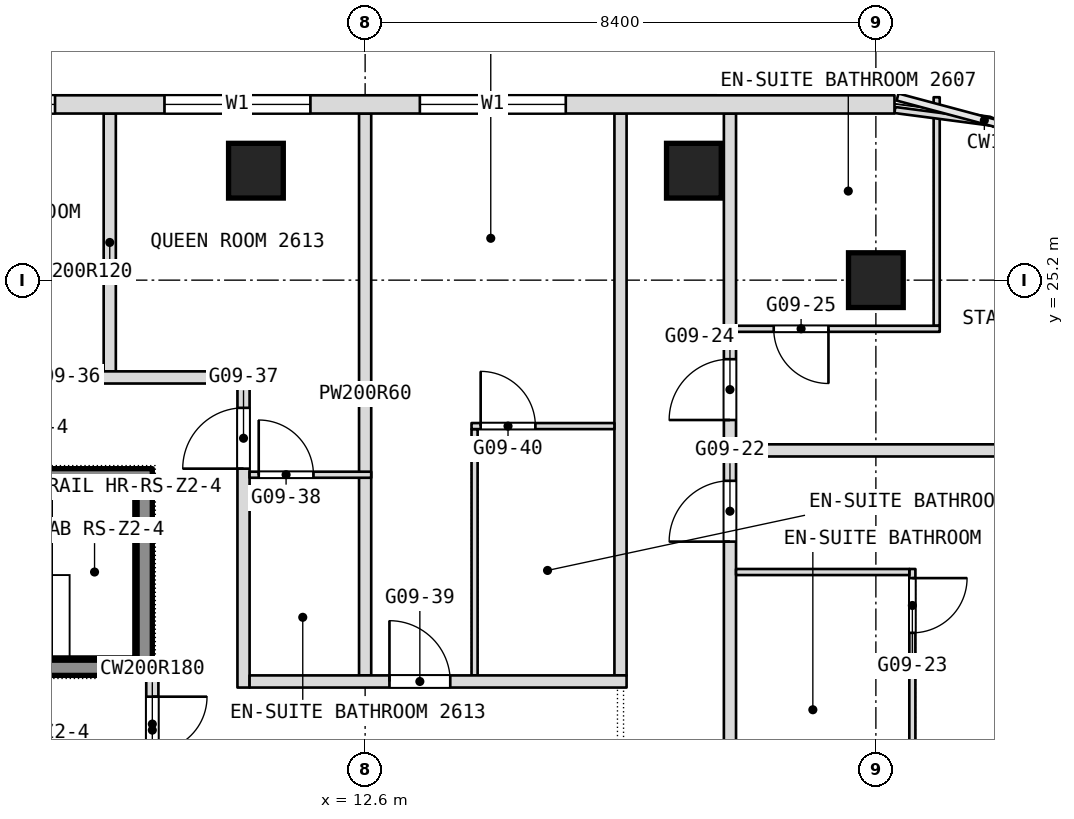
"""IFC4 building model, lengths in metres.
Left out: names, types, materials, properties, quantities, classifications, styles, units other than length and angle.
Written with IfcOpenShell. Run it as: python <this file> out.ifc"""

import sys

from ifc_helpers import new_model, si_unit, direction, frame, frame_2d, origin, origin_2d, place, context, subcontext, project, spatial, rectangle, extrude, element, fill, save


model = new_model("IFC4")
c1 = context("Model", 3, precision=1e-05, world=origin(), true_north=direction((0.0, 1.0)))
c2 = subcontext(c1, "Body", "Model", "MODEL_VIEW")
j1 = project(units=[si_unit("LENGTHUNIT", "METRE"), si_unit("PLANEANGLEUNIT", "RADIAN")], contexts=[c1])
p1 = place(None, origin())
s1 = spatial("IfcSite", under=j1, at=p1, CompositionType="ELEMENT")
p2 = place(p1, origin())
s2 = spatial("IfcBuilding", under=s1, at=p2, CompositionType="ELEMENT")
p3 = place(p2, frame((0.0, 0.0, 119.3)))
s3 = spatial("IfcBuildingStorey", under=s2, at=p3, CompositionType="ELEMENT", Elevation=119.3)
for number, where, z_axis, x_axis in (
    (1, (21.0, 25.2, 0.0), (0.0, 0.0, 1.0), (1.0, 0.0, 0.0)),
    (2, (10.804, 27.0, 0.0), (0.0, 0.0, 1.0), (1.0, 0.0, 0.0)),
    (3, (18.007, 27.0, 0.0), (0.0, 0.0, 1.0), (1.0, 0.0, 0.0)),
):
    element("IfcColumn", number, at=place(p3, frame(where, z_axis=z_axis, x_axis=x_axis)), inside=s3, PredefinedType="COLUMN", context=c2, shape_type="SweptSolid", body=[
        extrude(rectangle(XDim=0.9, YDim=0.9, at=origin_2d()), origin(), (0.0, 0.0, 1.0), 3.6),
    ])
p4 = place(p3, frame((22.0, 24.45, 0.0), z_axis=(0.0, 0.0, 1.0), x_axis=(0.0, 1.0, 0.0)))
e4 = element("IfcWall", 4, at=p4, inside=s3, PredefinedType="PARTITIONING", context=c2, shape_type="SweptSolid", body=[
    extrude(rectangle(XDim=3.758, YDim=0.1, at=frame_2d((1.879, 0.0))), origin(), (0.0, 0.0, 1.0), 3.34),
])
p5 = place(p3, frame((21.6, 16.9, 0.0), z_axis=(0.0, 0.0, 1.0), x_axis=(0.0, 1.0, 0.0)))
e5 = element("IfcWall", 5, at=p5, inside=s3, PredefinedType="PARTITIONING", context=c2, shape_type="SweptSolid", body=[
    extrude(rectangle(XDim=3.55, YDim=0.1, at=frame_2d((1.775, 0.0))), origin(), (0.0, 0.0, 1.0), 3.34),
])
p6 = place(p5, frame((2.5, 0.0, 0.0)))
e6 = element("IfcOpeningElement", 6, at=p6, cuts=e5, PredefinedType="OPENING", context=c2, shape_type="SweptSolid", body=[
    extrude(rectangle(XDim=0.9, YDim=2.1, at=frame_2d((0.45, 1.05))), frame((0.0, 0.05, 0.0), z_axis=(0.0, -1.0, 0.0), x_axis=(1.0, 0.0, 0.0)), (0.0, 0.0, 1.0), 0.1),
])
p7 = place(p3, frame((18.6, -21.708, 0.0), z_axis=(0.0, 0.0, 1.0), x_axis=(0.0, 1.0, 0.0)))
e7 = element("IfcWall", 7, at=p7, inside=s3, PredefinedType="PARTITIONING", context=c2, shape_type="SweptSolid", body=[
    extrude(rectangle(XDim=49.648, YDim=0.2, at=frame_2d((24.824, 0.0))), origin(), (0.0, 0.0, 1.0), 3.34),
])
p8 = place(p7, frame((2.8, 0.0, 0.0)))
e8 = element("IfcOpeningElement", 8, at=p8, cuts=e7, PredefinedType="OPENING", context=c2, shape_type="SweptSolid", body=[
    extrude(rectangle(XDim=1.0, YDim=2.1, at=frame_2d((0.5, 1.05))), frame((0.0, 0.1, 0.0), z_axis=(0.0, -1.0, 0.0), x_axis=(1.0, 0.0, 0.0)), (0.0, 0.0, 1.0), 0.2),
])
p9 = place(p7, frame((10.658, 0.0, 0.0)))
e9 = element("IfcOpeningElement", 9, at=p9, cuts=e7, PredefinedType="OPENING", context=c2, shape_type="SweptSolid", body=[
    extrude(rectangle(XDim=1.1, YDim=2.1, at=frame_2d((0.55, 1.05))), frame((0.0, 0.1, 0.0), z_axis=(0.0, -1.0, 0.0), x_axis=(1.0, 0.0, 0.0)), (0.0, 0.0, 1.0), 0.2),
])
p10 = place(p7, frame((16.608, 0.0, 0.0)))
e10 = element("IfcOpeningElement", 10, at=p10, cuts=e7, PredefinedType="OPENING", context=c2, shape_type="SweptSolid", body=[
    extrude(rectangle(XDim=1.8, YDim=2.1, at=frame_2d((0.9, 1.05))), frame((0.0, 0.1, 0.0), z_axis=(0.0, -1.0, 0.0), x_axis=(1.0, 0.0, 0.0)), (0.0, 0.0, 1.0), 0.2),
])
p11 = place(p7, frame((24.508, 0.0, 0.0)))
e11 = element("IfcOpeningElement", 11, at=p11, cuts=e7, PredefinedType="OPENING", context=c2, shape_type="SweptSolid", body=[
    extrude(rectangle(XDim=1.0, YDim=2.1, at=frame_2d((0.5, 1.05))), frame((0.0, 0.1, 0.0), z_axis=(0.0, -1.0, 0.0), x_axis=(1.0, 0.0, 0.0)), (0.0, 0.0, 1.0), 0.2),
])
p12 = place(p7, frame((26.308, 0.0, 0.0)))
e12 = element("IfcOpeningElement", 12, at=p12, cuts=e7, PredefinedType="OPENING", context=c2, shape_type="SweptSolid", body=[
    extrude(rectangle(XDim=1.0, YDim=2.1, at=frame_2d((0.5, 1.05))), frame((0.0, 0.1, 0.0), z_axis=(0.0, -1.0, 0.0), x_axis=(1.0, 0.0, 0.0)), (0.0, 0.0, 1.0), 0.2),
])
p13 = place(p7, frame((33.708, 0.0, 0.0)))
e13 = element("IfcOpeningElement", 13, at=p13, cuts=e7, PredefinedType="OPENING", context=c2, shape_type="SweptSolid", body=[
    extrude(rectangle(XDim=1.1, YDim=2.1, at=frame_2d((0.55, 1.05))), frame((0.0, 0.1, 0.0), z_axis=(0.0, -1.0, 0.0), x_axis=(1.0, 0.0, 0.0)), (0.0, 0.0, 1.0), 0.2),
])
p14 = place(p7, frame((42.608, 0.0, 0.0)))
e14 = element("IfcOpeningElement", 14, at=p14, cuts=e7, PredefinedType="OPENING", context=c2, shape_type="SweptSolid", body=[
    extrude(rectangle(XDim=1.0, YDim=2.1, at=frame_2d((0.5, 1.05))), frame((0.0, 0.1, 0.0), z_axis=(0.0, -1.0, 0.0), x_axis=(1.0, 0.0, 0.0)), (0.0, 0.0, 1.0), 0.2),
])
p15 = place(p7, frame((44.608, 0.0, 0.0)))
e15 = element("IfcOpeningElement", 15, at=p15, cuts=e7, PredefinedType="OPENING", context=c2, shape_type="SweptSolid", body=[
    extrude(rectangle(XDim=1.0, YDim=2.1, at=frame_2d((0.5, 1.05))), frame((0.0, 0.1, 0.0), z_axis=(0.0, -1.0, 0.0), x_axis=(1.0, 0.0, 0.0)), (0.0, 0.0, 1.0), 0.2),
])
p16 = place(p3, frame((16.8, 18.7, 0.0), z_axis=(0.0, 0.0, 1.0), x_axis=(0.0, 1.0, 0.0)))
e16 = element("IfcWall", 16, at=p16, inside=s3, PredefinedType="PARTITIONING", context=c2, shape_type="SweptSolid", body=[
    extrude(rectangle(XDim=9.24, YDim=0.2, at=frame_2d((4.62, 0.0))), origin(), (0.0, 0.0, 1.0), 3.34),
])
p17 = place(p3, frame((14.4, 18.7, 0.0), z_axis=(0.0, 0.0, 1.0), x_axis=(0.0, 1.0, 0.0)))
e17 = element("IfcWall", 17, at=p17, inside=s3, PredefinedType="PARTITIONING", context=c2, shape_type="SweptSolid", body=[
    extrude(rectangle(XDim=4.05, YDim=0.1, at=frame_2d((2.025, 0.0))), origin(), (0.0, 0.0, 1.0), 3.34),
])
p18 = place(p3, frame((12.6, 18.7, 0.0), z_axis=(0.0, 0.0, 1.0), x_axis=(0.0, 1.0, 0.0)))
e18 = element("IfcWall", 18, at=p18, inside=s3, PredefinedType="PARTITIONING", context=c2, shape_type="SweptSolid", body=[
    extrude(rectangle(XDim=9.24, YDim=0.2, at=frame_2d((4.62, 0.0))), origin(), (0.0, 0.0, 1.0), 3.34),
])
p19 = place(p3, frame((10.6, 18.5, 0.0), z_axis=(0.0, 0.0, 1.0), x_axis=(0.0, 1.0, 0.0)))
e19 = element("IfcWall", 19, at=p19, inside=s3, PredefinedType="PARTITIONING", context=c2, shape_type="SweptSolid", body=[
    extrude(rectangle(XDim=5.0, YDim=0.2, at=frame_2d((2.5, 0.0))), origin(), (0.0, 0.0, 1.0), 3.34),
])
p20 = place(p19, frame((3.6, 0.0, 0.0)))
e20 = element("IfcOpeningElement", 20, at=p20, cuts=e19, PredefinedType="OPENING", context=c2, shape_type="SweptSolid", body=[
    extrude(rectangle(XDim=1.0, YDim=2.1, at=frame_2d((0.5, 1.05))), frame((0.0, 0.1, 0.0), z_axis=(0.0, -1.0, 0.0), x_axis=(1.0, 0.0, 0.0)), (0.0, 0.0, 1.0), 0.2),
])
p21 = place(p3, frame((9.1, 16.9, 0.0), z_axis=(0.0, 0.0, 1.0), x_axis=(0.0, 1.0, 0.0)))
e21 = element("IfcWall", 21, at=p21, inside=s3, PredefinedType="PARTITIONING", context=c2, shape_type="SweptSolid", body=[
    extrude(rectangle(XDim=1.8, YDim=0.2, at=frame_2d((0.9, 0.0))), origin(), (0.0, 0.0, 1.0), 3.34),
])
p22 = place(p21, frame((0.55, 0.0, 0.0)))
e22 = element("IfcOpeningElement", 22, at=p22, cuts=e21, PredefinedType="OPENING", context=c2, shape_type="SweptSolid", body=[
    extrude(rectangle(XDim=0.9, YDim=2.1, at=frame_2d((0.45, 1.05))), frame((0.0, 0.1, 0.0), z_axis=(0.0, -1.0, 0.0), x_axis=(1.0, 0.0, 0.0)), (0.0, 0.0, 1.0), 0.2),
])
p23 = place(p3, frame((8.4, 23.7, 0.0), z_axis=(0.0, 0.0, 1.0), x_axis=(0.0, 1.0, 0.0)))
e23 = element("IfcWall", 23, at=p23, inside=s3, PredefinedType="PARTITIONING", context=c2, shape_type="SweptSolid", body=[
    extrude(rectangle(XDim=4.24, YDim=0.2, at=frame_2d((2.12, 0.0))), origin(), (0.0, 0.0, 1.0), 3.34),
])
p24 = place(p3, frame((10.7, 18.6, 0.0), z_axis=(0.0, 0.0, 1.0), x_axis=(1.0, 0.0, 0.0)))
e24 = element("IfcWall", 24, at=p24, inside=s3, PredefinedType="PARTITIONING", context=c2, shape_type="SweptSolid", body=[
    extrude(rectangle(XDim=6.2, YDim=0.2, at=frame_2d((3.1, 0.0))), origin(), (0.0, 0.0, 1.0), 3.34),
])
p25 = place(p24, frame((2.3, 0.0, 0.0)))
e25 = element("IfcOpeningElement", 25, at=p25, cuts=e24, PredefinedType="OPENING", context=c2, shape_type="SweptSolid", body=[
    extrude(rectangle(XDim=1.0, YDim=2.1, at=frame_2d((0.5, 1.05))), frame((0.0, 0.1, 0.0), z_axis=(0.0, -1.0, 0.0), x_axis=(1.0, 0.0, 0.0)), (0.0, 0.0, 1.0), 0.2),
])
p26 = place(p3, frame((18.7, 20.4, 0.0), z_axis=(0.0, 0.0, 1.0), x_axis=(1.0, 0.0, 0.0)))
e26 = element("IfcWall", 26, at=p26, inside=s3, PredefinedType="PARTITIONING", context=c2, shape_type="SweptSolid", body=[
    extrude(rectangle(XDim=2.85, YDim=0.1, at=frame_2d((1.425, 0.0))), origin(), (0.0, 0.0, 1.0), 3.34),
])
p27 = place(p3, frame((10.7, 22.0, 0.0), z_axis=(0.0, 0.0, 1.0), x_axis=(1.0, 0.0, 0.0)))
e27 = element("IfcWall", 27, at=p27, inside=s3, PredefinedType="PARTITIONING", context=c2, shape_type="SweptSolid", body=[
    extrude(rectangle(XDim=2.0, YDim=0.1, at=frame_2d((1.0, 0.0))), origin(), (0.0, 0.0, 1.0), 3.34),
])
p28 = place(p27, frame((0.15, 0.0, 0.0)))
e28 = element("IfcOpeningElement", 28, at=p28, cuts=e27, PredefinedType="OPENING", context=c2, shape_type="SweptSolid", body=[
    extrude(rectangle(XDim=0.9, YDim=2.1, at=frame_2d((0.45, 1.05))), frame((0.0, 0.05, 0.0), z_axis=(0.0, -1.0, 0.0), x_axis=(1.0, 0.0, 0.0)), (0.0, 0.0, 1.0), 0.1),
])
p29 = place(p3, frame((18.7, 22.4, 0.0), z_axis=(0.0, 0.0, 1.0), x_axis=(1.0, 0.0, 0.0)))
e29 = element("IfcWall", 29, at=p29, inside=s3, PredefinedType="PARTITIONING", context=c2, shape_type="SweptSolid", body=[
    extrude(rectangle(XDim=8.847, YDim=0.2, at=frame_2d((4.424, 0.0))), origin(), (0.0, 0.0, 1.0), 3.34),
])
p30 = place(p3, frame((14.35, 22.8, 0.0), z_axis=(0.0, 0.0, 1.0), x_axis=(1.0, 0.0, 0.0)))
e30 = element("IfcWall", 30, at=p30, inside=s3, PredefinedType="PARTITIONING", context=c2, shape_type="SweptSolid", body=[
    extrude(rectangle(XDim=2.35, YDim=0.1, at=frame_2d((1.175, 0.0))), origin(), (0.0, 0.0, 1.0), 3.34),
])
p31 = place(p30, frame((0.15, 0.0, 0.0)))
e31 = element("IfcOpeningElement", 31, at=p31, cuts=e30, PredefinedType="OPENING", context=c2, shape_type="SweptSolid", body=[
    extrude(rectangle(XDim=0.9, YDim=2.1, at=frame_2d((0.45, 1.05))), frame((0.0, 0.05, 0.0), z_axis=(0.0, -1.0, 0.0), x_axis=(1.0, 0.0, 0.0)), (0.0, 0.0, 1.0), 0.1),
])
p32 = place(p3, frame((1.5, 23.6, 0.0), z_axis=(0.0, 0.0, 1.0), x_axis=(1.0, 0.0, 0.0)))
e32 = element("IfcWall", 32, at=p32, inside=s3, PredefinedType="PARTITIONING", context=c2, shape_type="SweptSolid", body=[
    extrude(rectangle(XDim=9.2, YDim=0.2, at=frame_2d((4.6, 0.0))), origin(), (0.0, 0.0, 1.0), 3.34),
])
p33 = place(p32, frame((4.3, 0.0, 0.0)))
e33 = element("IfcOpeningElement", 33, at=p33, cuts=e32, PredefinedType="OPENING", context=c2, shape_type="SweptSolid", body=[
    extrude(rectangle(XDim=1.0, YDim=2.1, at=frame_2d((0.5, 1.05))), frame((0.0, 0.1, 0.0), z_axis=(0.0, -1.0, 0.0), x_axis=(1.0, 0.0, 0.0)), (0.0, 0.0, 1.0), 0.2),
])
p34 = place(p3, frame((18.7, 24.4, 0.0), z_axis=(0.0, 0.0, 1.0), x_axis=(1.0, 0.0, 0.0)))
e34 = element("IfcWall", 34, at=p34, inside=s3, PredefinedType="PARTITIONING", context=c2, shape_type="SweptSolid", body=[
    extrude(rectangle(XDim=3.35, YDim=0.1, at=frame_2d((1.675, 0.0))), origin(), (0.0, 0.0, 1.0), 3.34),
])
p35 = place(p34, frame((0.62, 0.0, 0.0)))
e35 = element("IfcOpeningElement", 35, at=p35, cuts=e34, PredefinedType="OPENING", context=c2, shape_type="SweptSolid", body=[
    extrude(rectangle(XDim=0.9, YDim=2.1, at=frame_2d((0.45, 1.05))), frame((0.0, 0.05, 0.0), z_axis=(0.0, -1.0, 0.0), x_axis=(1.0, 0.0, 0.0)), (0.0, 0.0, 1.0), 0.1),
])
p36 = place(p3, frame((21.312, 27.998, 0.0), z_axis=(0.0, 0.0, 1.0), x_axis=(0.991547575144, -0.129743617284, 0.0)))
e36 = element("IfcWall", 36, at=p36, inside=s3, PredefinedType="PARTITIONING", context=c2, shape_type="SweptSolid", body=[
    extrude(rectangle(XDim=1.626, YDim=0.1, at=frame_2d((0.813, 0.0))), origin(), (0.0, 0.0, 1.0), 3.34),
])
p37 = place(p3, frame((21.306, 28.09, 0.0), z_axis=(0.0, 0.0, 1.0), x_axis=(-1.0, 0.0, 0.0)))
e37 = element("IfcWall", 37, at=p37, inside=s3, PredefinedType="NOTDEFINED", context=c2, shape_type="SweptSolid", body=[
    extrude(rectangle(XDim=42.612, YDim=0.3, at=frame_2d((21.306, 0.0))), origin(), (0.0, 0.0, 1.0), 3.6),
])
p38 = place(p37, frame((5.406, 0.0, 0.9)))
e38 = element("IfcOpeningElement", 38, at=p38, cuts=e37, PredefinedType="OPENING", context=c2, shape_type="SweptSolid", body=[
    extrude(rectangle(XDim=2.4, YDim=2.1, at=frame_2d((1.2, 1.05))), frame((0.0, 0.15, 0.0), z_axis=(0.0, -1.0, 0.0), x_axis=(1.0, 0.0, 0.0)), (0.0, 0.0, 1.0), 0.3),
])
p39 = place(p37, frame((9.606, 0.0, 0.9)))
e39 = element("IfcOpeningElement", 39, at=p39, cuts=e37, PredefinedType="OPENING", context=c2, shape_type="SweptSolid", body=[
    extrude(rectangle(XDim=2.4, YDim=2.1, at=frame_2d((1.2, 1.05))), frame((0.0, 0.15, 0.0), z_axis=(0.0, -1.0, 0.0), x_axis=(1.0, 0.0, 0.0)), (0.0, 0.0, 1.0), 0.3),
])
p40 = place(p37, frame((13.806, 0.0, 0.9)))
e40 = element("IfcOpeningElement", 40, at=p40, cuts=e37, PredefinedType="OPENING", context=c2, shape_type="SweptSolid", body=[
    extrude(rectangle(XDim=2.4, YDim=2.1, at=frame_2d((1.2, 1.05))), frame((0.0, 0.15, 0.0), z_axis=(0.0, -1.0, 0.0), x_axis=(1.0, 0.0, 0.0)), (0.0, 0.0, 1.0), 0.3),
])
p41 = place(p37, frame((18.006, 0.0, 0.9)))
e41 = element("IfcOpeningElement", 41, at=p41, cuts=e37, PredefinedType="OPENING", context=c2, shape_type="SweptSolid", body=[
    extrude(rectangle(XDim=2.4, YDim=2.1, at=frame_2d((1.2, 1.05))), frame((0.0, 0.15, 0.0), z_axis=(0.0, -1.0, 0.0), x_axis=(1.0, 0.0, 0.0)), (0.0, 0.0, 1.0), 0.3),
])
p42 = place(p37, frame((22.206, 0.0, 0.9)))
e42 = element("IfcOpeningElement", 42, at=p42, cuts=e37, PredefinedType="OPENING", context=c2, shape_type="SweptSolid", body=[
    extrude(rectangle(XDim=2.4, YDim=2.1, at=frame_2d((1.2, 1.05))), frame((0.0, 0.15, 0.0), z_axis=(0.0, -1.0, 0.0), x_axis=(1.0, 0.0, 0.0)), (0.0, 0.0, 1.0), 0.3),
])
p43 = place(p37, frame((26.406, 0.0, 0.9)))
e43 = element("IfcOpeningElement", 43, at=p43, cuts=e37, PredefinedType="OPENING", context=c2, shape_type="SweptSolid", body=[
    extrude(rectangle(XDim=2.4, YDim=2.1, at=frame_2d((1.2, 1.05))), frame((0.0, 0.15, 0.0), z_axis=(0.0, -1.0, 0.0), x_axis=(1.0, 0.0, 0.0)), (0.0, 0.0, 1.0), 0.3),
])
p44 = place(p37, frame((30.606, 0.0, 0.9)))
e44 = element("IfcOpeningElement", 44, at=p44, cuts=e37, PredefinedType="OPENING", context=c2, shape_type="SweptSolid", body=[
    extrude(rectangle(XDim=2.4, YDim=2.1, at=frame_2d((1.2, 1.05))), frame((0.0, 0.15, 0.0), z_axis=(0.0, -1.0, 0.0), x_axis=(1.0, 0.0, 0.0)), (0.0, 0.0, 1.0), 0.3),
])
p45 = place(p37, frame((34.806, 0.0, 0.9)))
e45 = element("IfcOpeningElement", 45, at=p45, cuts=e37, PredefinedType="OPENING", context=c2, shape_type="SweptSolid", body=[
    extrude(rectangle(XDim=2.4, YDim=2.1, at=frame_2d((1.2, 1.05))), frame((0.0, 0.15, 0.0), z_axis=(0.0, -1.0, 0.0), x_axis=(1.0, 0.0, 0.0)), (0.0, 0.0, 1.0), 0.3),
])
p46 = place(p3, frame((2.9, 18.825, 0.1), z_axis=(0.0, 0.0, 1.0), x_axis=(1.0, 0.0, 0.0)))
e46 = element("IfcWall", 46, at=p46, inside=s3, PredefinedType="SHEAR", context=c2, shape_type="SweptSolid", body=[
    extrude(rectangle(XDim=6.2, YDim=0.25, at=frame_2d((3.1, 0.0))), origin(), (0.0, 0.0, 1.0), 3.6),
])
p47 = place(p46, frame((0.45, 0.0, 0.0)))
e47 = element("IfcOpeningElement", 47, at=p47, cuts=e46, PredefinedType="OPENING", context=c2, shape_type="SweptSolid", body=[
    extrude(rectangle(XDim=1.0, YDim=2.1, at=frame_2d((0.5, 1.05))), frame((0.0, 0.125, 0.0), z_axis=(0.0, -1.0, 0.0), x_axis=(1.0, 0.0, 0.0)), (0.0, 0.0, 1.0), 0.25),
])
p48 = place(p3, frame((2.9, 21.975, 0.1), z_axis=(0.0, 0.0, 1.0), x_axis=(1.0, 0.0, 0.0)))
e48 = element("IfcWall", 48, at=p48, inside=s3, PredefinedType="SHEAR", context=c2, shape_type="SweptSolid", body=[
    extrude(rectangle(XDim=6.2, YDim=0.25, at=frame_2d((3.1, 0.0))), origin(), (0.0, 0.0, 1.0), 3.6),
])
p49 = place(p3, frame((8.975, 18.95, 0.1), z_axis=(0.0, 0.0, 1.0), x_axis=(0.0, 1.0, 0.0)))
e49 = element("IfcWall", 49, at=p49, inside=s3, PredefinedType="SHEAR", context=c2, shape_type="SweptSolid", body=[
    extrude(rectangle(XDim=2.9, YDim=0.25, at=frame_2d((1.45, 0.0))), origin(), (0.0, 0.0, 1.0), 3.6),
])
p50 = place(p6, origin())
e50 = element("IfcDoor", 50, at=p50, inside=s3, OperationType="SINGLE_SWING_RIGHT", PredefinedType="DOOR", context=c2, shape_type="SweptSolid", body=[
    extrude(rectangle(XDim=0.9, YDim=2.1, at=frame_2d((0.45, 1.05))), frame((0.0, 0.025, 0.0), z_axis=(0.0, -1.0, 0.0), x_axis=(1.0, 0.0, 0.0)), (0.0, 0.0, 1.0), 0.05),
])
fill(e6, e50)
p51 = place(p14, origin())
e51 = element("IfcDoor", 51, at=p51, inside=s3, OperationType="SINGLE_SWING_RIGHT", PredefinedType="DOOR", context=c2, shape_type="SweptSolid", body=[
    extrude(rectangle(XDim=1.0, YDim=2.1, at=frame_2d((0.5, 1.05))), frame((0.0, 0.025, 0.0), z_axis=(0.0, -1.0, 0.0), x_axis=(1.0, 0.0, 0.0)), (0.0, 0.0, 1.0), 0.05),
])
fill(e14, e51)
p52 = place(p15, origin())
e52 = element("IfcDoor", 52, at=p52, inside=s3, OperationType="SINGLE_SWING_RIGHT", PredefinedType="DOOR", context=c2, shape_type="SweptSolid", body=[
    extrude(rectangle(XDim=1.0, YDim=2.1, at=frame_2d((0.5, 1.05))), frame((0.0, 0.025, 0.0), z_axis=(0.0, -1.0, 0.0), x_axis=(1.0, 0.0, 0.0)), (0.0, 0.0, 1.0), 0.05),
])
fill(e15, e52)
p53 = place(p20, origin())
e53 = element("IfcDoor", 53, at=p53, inside=s3, OperationType="SINGLE_SWING_LEFT", PredefinedType="DOOR", context=c2, shape_type="SweptSolid", body=[
    extrude(rectangle(XDim=1.0, YDim=2.1, at=frame_2d((0.5, 1.05))), frame((0.0, 0.025, 0.0), z_axis=(0.0, -1.0, 0.0), x_axis=(1.0, 0.0, 0.0)), (0.0, 0.0, 1.0), 0.05),
])
fill(e20, e53)
p54 = place(p22, origin())
e54 = element("IfcDoor", 54, at=p54, inside=s3, OperationType="SINGLE_SWING_RIGHT", PredefinedType="DOOR", context=c2, shape_type="SweptSolid", body=[
    extrude(rectangle(XDim=0.9, YDim=2.1, at=frame_2d((0.45, 1.05))), frame((0.0, 0.025, 0.0), z_axis=(0.0, -1.0, 0.0), x_axis=(1.0, 0.0, 0.0)), (0.0, 0.0, 1.0), 0.05),
])
fill(e22, e54)
p55 = place(p25, origin())
e55 = element("IfcDoor", 55, at=p55, inside=s3, OperationType="SINGLE_SWING_RIGHT", PredefinedType="DOOR", context=c2, shape_type="SweptSolid", body=[
    extrude(rectangle(XDim=1.0, YDim=2.1, at=frame_2d((0.5, 1.05))), frame((0.0, 0.025, 0.0), z_axis=(0.0, -1.0, 0.0), x_axis=(1.0, 0.0, 0.0)), (0.0, 0.0, 1.0), 0.05),
])
fill(e25, e55)
p56 = place(p28, origin())
e56 = element("IfcDoor", 56, at=p56, inside=s3, OperationType="SINGLE_SWING_RIGHT", PredefinedType="DOOR", context=c2, shape_type="SweptSolid", body=[
    extrude(rectangle(XDim=0.9, YDim=2.1, at=frame_2d((0.45, 1.05))), frame((0.0, 0.025, 0.0), z_axis=(0.0, -1.0, 0.0), x_axis=(1.0, 0.0, 0.0)), (0.0, 0.0, 1.0), 0.05),
])
fill(e28, e56)
p57 = place(p31, origin())
e57 = element("IfcDoor", 57, at=p57, inside=s3, OperationType="SINGLE_SWING_RIGHT", PredefinedType="DOOR", context=c2, shape_type="SweptSolid", body=[
    extrude(rectangle(XDim=0.9, YDim=2.1, at=frame_2d((0.45, 1.05))), frame((0.0, 0.025, 0.0), z_axis=(0.0, -1.0, 0.0), x_axis=(1.0, 0.0, 0.0)), (0.0, 0.0, 1.0), 0.05),
])
fill(e31, e57)
p58 = place(p35, origin())
e58 = element("IfcDoor", 58, at=p58, inside=s3, OperationType="SINGLE_SWING_RIGHT", PredefinedType="DOOR", context=c2, shape_type="SweptSolid", body=[
    extrude(rectangle(XDim=0.9, YDim=2.1, at=frame_2d((0.45, 1.05))), frame((0.0, 0.025, 0.0), z_axis=(0.0, -1.0, 0.0), x_axis=(1.0, 0.0, 0.0)), (0.0, 0.0, 1.0), 0.05),
])
fill(e35, e58)
p59 = place(p38, origin())
e59 = element("IfcWindow", 59, at=p59, inside=s3, PartitioningType="SINGLE_PANEL", PredefinedType="WINDOW", context=c2, shape_type="SweptSolid", body=[
    extrude(rectangle(XDim=2.4, YDim=2.1, at=frame_2d((1.2, 1.05))), frame((0.0, 0.03, 0.0), z_axis=(0.0, -1.0, 0.0), x_axis=(1.0, 0.0, 0.0)), (0.0, 0.0, 1.0), 0.06),
])
fill(e38, e59)
p60 = place(p39, origin())
e60 = element("IfcWindow", 60, at=p60, inside=s3, PartitioningType="SINGLE_PANEL", PredefinedType="WINDOW", context=c2, shape_type="SweptSolid", body=[
    extrude(rectangle(XDim=2.4, YDim=2.1, at=frame_2d((1.2, 1.05))), frame((0.0, 0.03, 0.0), z_axis=(0.0, -1.0, 0.0), x_axis=(1.0, 0.0, 0.0)), (0.0, 0.0, 1.0), 0.06),
])
fill(e39, e60)
p61 = place(p40, origin())
e61 = element("IfcWindow", 61, at=p61, inside=s3, PartitioningType="SINGLE_PANEL", PredefinedType="WINDOW", context=c2, shape_type="SweptSolid", body=[
    extrude(rectangle(XDim=2.4, YDim=2.1, at=frame_2d((1.2, 1.05))), frame((0.0, 0.03, 0.0), z_axis=(0.0, -1.0, 0.0), x_axis=(1.0, 0.0, 0.0)), (0.0, 0.0, 1.0), 0.06),
])
fill(e40, e61)
save(model, sys.argv[1])
